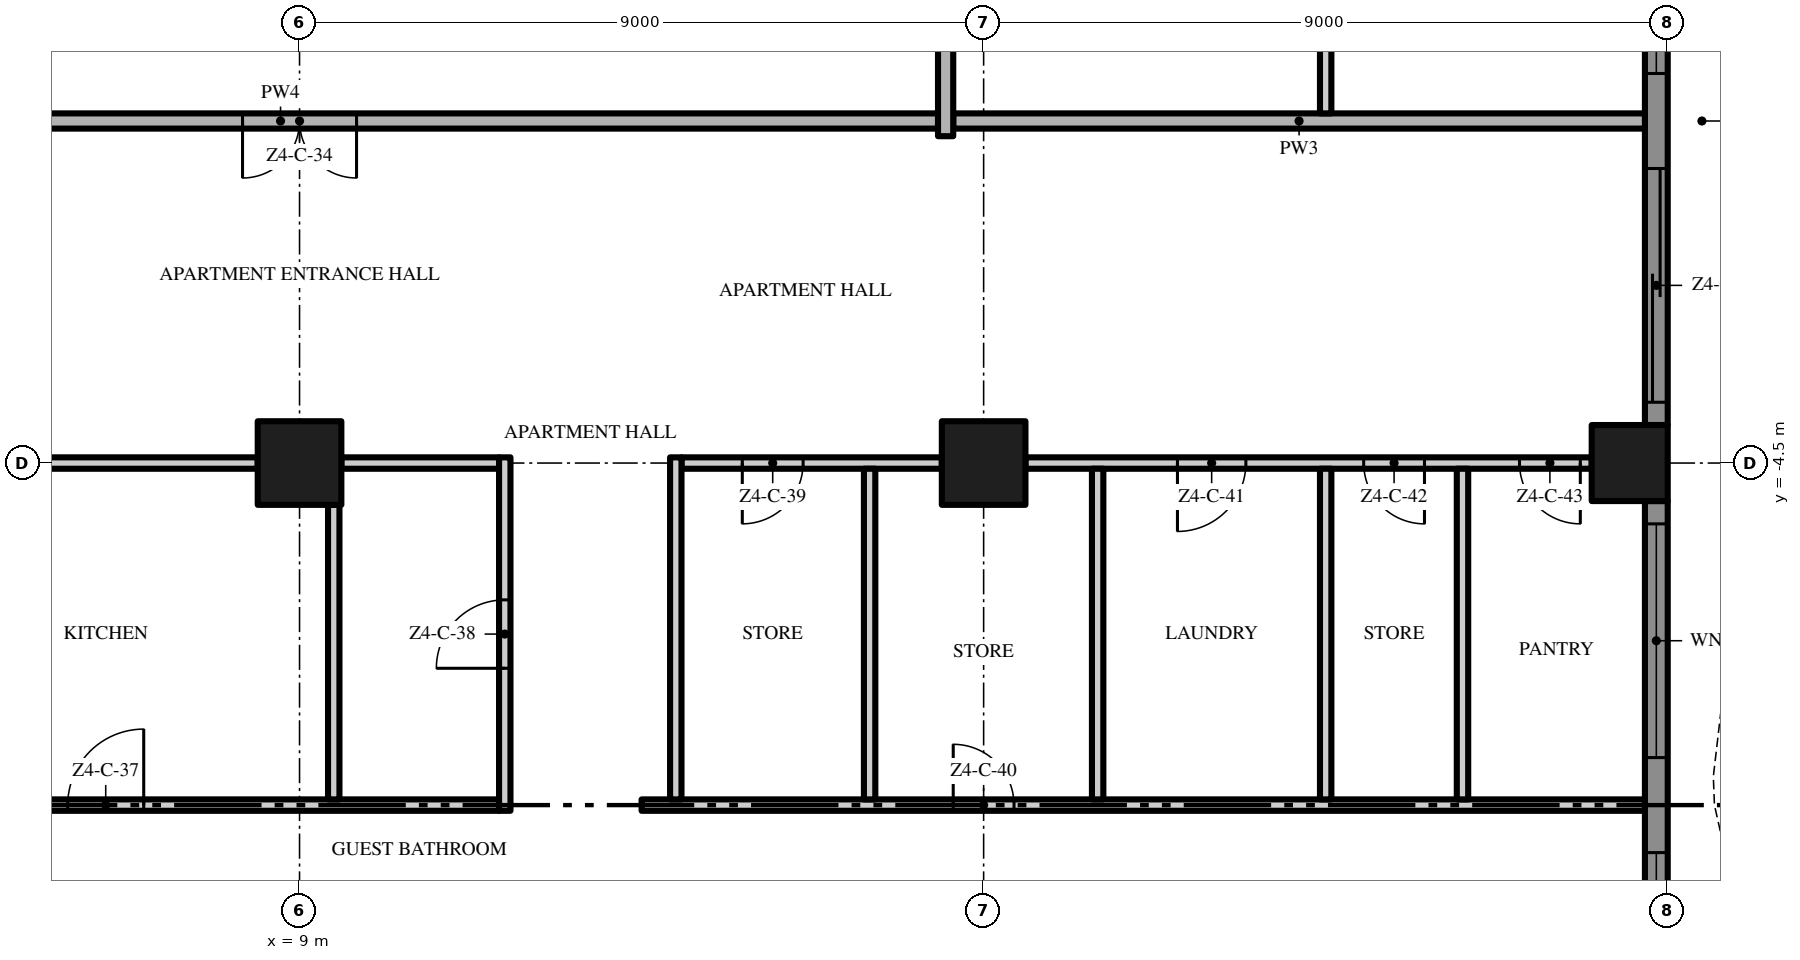
"""IFC4 building model, lengths in metres.
Left out: names, types, materials, properties, quantities, classifications, styles, units other than length and angle.
Written with IfcOpenShell. Run it as: python <this file> out.ifc"""

import sys

from ifc_helpers import new_model, si_unit, direction, frame, frame_2d, origin, origin_2d, place, context, subcontext, project, spatial, polyline, rectangle, outline, extrude, element, fill, save


model = new_model("IFC4")
c1 = context("Model", 3, precision=1e-05, world=origin(), true_north=direction((0.0, 1.0)))
c2 = subcontext(c1, "Body", "Model", "MODEL_VIEW")
j1 = project(units=[si_unit("LENGTHUNIT", "METRE"), si_unit("PLANEANGLEUNIT", "RADIAN")], contexts=[c1])
p1 = place(None, origin())
s1 = spatial("IfcSite", under=j1, at=p1, CompositionType="ELEMENT")
p2 = place(p1, origin())
s2 = spatial("IfcBuilding", under=s1, at=p2, CompositionType="ELEMENT")
p3 = place(p2, frame((0.0, 0.0, 214.8)))
s3 = spatial("IfcBuildingStorey", under=s2, at=p3, CompositionType="ELEMENT", Elevation=214.8)
p4 = place(p3, frame((18.0, -4.5, 0.0), z_axis=(0.0, 0.0, 1.0), x_axis=(1.0, 0.0, 0.0)))
e1 = element("IfcColumn", 1, at=p4, inside=s3, PredefinedType="COLUMN", context=c2, shape_type="SweptSolid", body=[
    extrude(rectangle(XDim=1.1, YDim=1.1, at=origin_2d()), origin(), (0.0, 0.0, 1.0), 3.5),
])
p5 = place(p3, frame((26.5, -4.5, 0.0), z_axis=(0.0, 0.0, 1.0), x_axis=(1.0, 0.0, 0.0)))
e2 = element("IfcColumn", 2, at=p5, inside=s3, PredefinedType="COLUMN", context=c2, shape_type="SweptSolid", body=[
    extrude(rectangle(XDim=1.0, YDim=1.0, at=origin_2d()), origin(), (0.0, 0.0, 1.0), 3.5),
])
p6 = place(p3, frame((9.0, -4.5, 0.0), z_axis=(0.0, 0.0, 1.0), x_axis=(1.0, 0.0, 0.0)))
e3 = element("IfcColumn", 3, at=p6, inside=s3, PredefinedType="COLUMN", context=c2, shape_type="SweptSolid", body=[
    extrude(rectangle(XDim=1.1, YDim=1.1, at=origin_2d()), origin(), (0.0, 0.0, 1.0), 3.5),
])
p7 = place(p3, frame((26.85, -5.0, 0.0), z_axis=(0.0, 0.0, 1.0), x_axis=(0.0, -1.0, 0.0)))
e4 = element("IfcWall", 4, at=p7, inside=s3, PredefinedType="SOLIDWALL", context=c2, shape_type="SweptSolid", body=[
    extrude(rectangle(XDim=8.0, YDim=0.3, at=frame_2d((4.0, 0.0))), origin(), (0.0, 0.0, 1.0), 3.5),
])
p8 = place(p7, frame((4.625, 0.0, 0.45)))
e5 = element("IfcOpeningElement", 5, at=p8, cuts=e4, PredefinedType="OPENING", context=c2, shape_type="SweptSolid", body=[
    extrude(rectangle(XDim=3.075, YDim=2.65, at=frame_2d((1.538, 1.325))), frame((0.0, 0.16, 0.0), z_axis=(0.0, -1.0, 0.0), x_axis=(1.0, 0.0, 0.0)), (0.0, 0.0, 1.0), 0.32),
])
p9 = place(p7, frame((0.3, 0.0, 0.45)))
e6 = element("IfcOpeningElement", 6, at=p9, cuts=e4, PredefinedType="OPENING", context=c2, shape_type="SweptSolid", body=[
    extrude(rectangle(XDim=3.075, YDim=2.65, at=frame_2d((1.538, 1.325))), frame((0.0, 0.16, 0.0), z_axis=(0.0, -1.0, 0.0), x_axis=(1.0, 0.0, 0.0)), (0.0, 0.0, 1.0), 0.32),
])
p10 = place(p3, frame((26.85, 4.0, 0.0), z_axis=(0.0, 0.0, 1.0), x_axis=(0.0, -1.0, 0.0)))
e7 = element("IfcWall", 7, at=p10, inside=s3, PredefinedType="SOLIDWALL", context=c2, shape_type="SweptSolid", body=[
    extrude(rectangle(XDim=8.0, YDim=0.3, at=frame_2d((4.0, 0.0))), origin(), (0.0, 0.0, 1.0), 3.5),
])
p11 = place(p10, frame((4.625, 0.0, 0.0)))
e8 = element("IfcOpeningElement", 8, at=p11, cuts=e7, PredefinedType="OPENING", context=c2, shape_type="SweptSolid", body=[
    extrude(rectangle(XDim=3.075, YDim=2.4, at=frame_2d((1.538, 1.2))), frame((0.0, 0.16, 0.0), z_axis=(0.0, -1.0, 0.0), x_axis=(1.0, 0.0, 0.0)), (0.0, 0.0, 1.0), 0.32),
])
p12 = place(p10, frame((0.3, 0.0, 0.45)))
e9 = element("IfcOpeningElement", 9, at=p12, cuts=e7, PredefinedType="OPENING", context=c2, shape_type="SweptSolid", body=[
    extrude(rectangle(XDim=3.075, YDim=2.65, at=frame_2d((1.538, 1.325))), frame((0.0, 0.16, 0.0), z_axis=(0.0, -1.0, 0.0), x_axis=(1.0, 0.0, 0.0)), (0.0, 0.0, 1.0), 0.32),
])
p13 = place(p3, origin())
e10 = element("IfcWall", 10, at=p13, inside=s3, PredefinedType="USERDEFINED", context=c2, shape_type="SweptSolid", body=[
    extrude(outline(polyline([(29.649, -18.0), (29.985, -16.5), (30.0, -16.125), (29.869, -15.0), (29.345, -13.5), (28.612, -12.0), (27.951, -10.5), (27.615, -9.0), (27.6, -8.625), (27.731, -7.5), (28.255, -6.0), (28.988, -4.5), (29.649, -3.0), (29.985, -1.5), (30.0, -1.125), (29.869, 0.0), (29.345, 1.5), (28.612, 3.0), (27.951, 4.5), (27.615, 6.0), (27.6, 6.375), (27.731, 7.5), (28.255, 9.0), (28.988, 10.5), (29.649, 12.0), (29.985, 13.5), (30.0, 13.875), (29.869, 15.0), (29.345, 16.5), (28.612, 18.0), (28.388, 17.89), (29.114, 16.404), (29.624, 14.944), (29.749, 13.865), (29.736, 13.533), (29.41, 12.079), (28.761, 10.605), (28.024, 9.096), (27.486, 7.556), (27.349, 6.385), (27.366, 5.967), (27.713, 4.421), (28.385, 2.895), (29.114, 1.404), (29.624, -0.056), (29.749, -1.135), (29.736, -1.467), (29.41, -2.921), (28.761, -4.395), (28.024, -5.904), (27.486, -7.444), (27.349, -8.615), (27.366, -9.033), (27.713, -10.579), (28.385, -12.105), (29.114, -13.596), (29.624, -15.056), (29.749, -16.135), (29.736, -16.467), (29.405, -17.945), (29.649, -18.0)])), origin(), (0.0, 0.0, 1.0), 0.9),
])
p14 = place(p3, frame((0.1, -9.0, 0.0), z_axis=(0.0, 0.0, 1.0), x_axis=(1.0, 0.0, 0.0)))
e11 = element("IfcWall", 11, at=p14, inside=s3, PredefinedType="PARTITIONING", context=c2, shape_type="SweptSolid", body=[
    extrude(rectangle(XDim=11.525, YDim=0.15, at=frame_2d((5.763, 0.0))), origin(), (0.0, 0.0, 1.0), 3.5),
])
p15 = place(p14, frame((5.85, 0.0, 0.0)))
e12 = element("IfcOpeningElement", 12, at=p15, cuts=e11, PredefinedType="OPENING", context=c2, shape_type="SweptSolid", body=[
    extrude(rectangle(XDim=1.0, YDim=2.4, at=frame_2d((0.5, 1.2))), frame((0.0, 0.085, 0.0), z_axis=(0.0, -1.0, 0.0), x_axis=(1.0, 0.0, 0.0)), (0.0, 0.0, 1.0), 0.17),
])
p16 = place(p3, frame((13.5, -9.0, 0.0), z_axis=(0.0, 0.0, 1.0), x_axis=(1.0, 0.0, 0.0)))
e13 = element("IfcWall", 13, at=p16, inside=s3, PredefinedType="PARTITIONING", context=c2, shape_type="SweptSolid", body=[
    extrude(rectangle(XDim=13.2, YDim=0.15, at=frame_2d((6.6, 0.0))), origin(), (0.0, 0.0, 1.0), 3.5),
])
p17 = place(p16, frame((4.1, 0.0, 0.0)))
e14 = element("IfcOpeningElement", 14, at=p17, cuts=e13, PredefinedType="OPENING", context=c2, shape_type="SweptSolid", body=[
    extrude(rectangle(XDim=0.8, YDim=2.0, at=frame_2d((0.4, 1.0))), frame((0.0, 0.085, 0.0), z_axis=(0.0, -1.0, 0.0), x_axis=(1.0, 0.0, 0.0)), (0.0, 0.0, 1.0), 0.17),
])
p18 = place(p3, frame((8.45, -4.5, 0.0), z_axis=(0.0, 0.0, 1.0), x_axis=(-1.0, 0.0, 0.0)))
e15 = element("IfcWall", 15, at=p18, inside=s3, PredefinedType="PARTITIONING", context=c2, shape_type="SweptSolid", body=[
    extrude(rectangle(XDim=7.9, YDim=0.15, at=frame_2d((3.95, 0.0))), origin(), (0.0, 0.0, 1.0), 3.5),
])
p19 = place(p18, frame((6.95, 0.0, 0.0)))
e16 = element("IfcOpeningElement", 16, at=p19, cuts=e15, PredefinedType="OPENING", context=c2, shape_type="SweptSolid", body=[
    extrude(rectangle(XDim=0.8, YDim=2.0, at=frame_2d((0.4, 1.0))), frame((0.0, 0.085, 0.0), z_axis=(0.0, -1.0, 0.0), x_axis=(1.0, 0.0, 0.0)), (0.0, 0.0, 1.0), 0.17),
])
p20 = place(p18, frame((5.45, 0.0, 0.0)))
e17 = element("IfcOpeningElement", 17, at=p20, cuts=e15, PredefinedType="OPENING", context=c2, shape_type="SweptSolid", body=[
    extrude(rectangle(XDim=0.8, YDim=2.0, at=frame_2d((0.4, 1.0))), frame((0.0, 0.085, 0.0), z_axis=(0.0, -1.0, 0.0), x_axis=(1.0, 0.0, 0.0)), (0.0, 0.0, 1.0), 0.17),
])
p21 = place(p3, frame((9.55, -4.5, 0.0), z_axis=(0.0, 0.0, 1.0), x_axis=(1.0, 0.0, 0.0)))
e18 = element("IfcWall", 18, at=p21, inside=s3, PredefinedType="PARTITIONING", context=c2, shape_type="SweptSolid", body=[
    extrude(rectangle(XDim=2.075, YDim=0.15, at=frame_2d((1.038, 0.0))), origin(), (0.0, 0.0, 1.0), 3.5),
])
p22 = place(p3, frame((17.45, -4.5, 0.0), z_axis=(0.0, 0.0, 1.0), x_axis=(-1.0, 0.0, 0.0)))
e19 = element("IfcWall", 19, at=p22, inside=s3, PredefinedType="PARTITIONING", context=c2, shape_type="SweptSolid", body=[
    extrude(rectangle(XDim=3.425, YDim=0.15, at=frame_2d((1.712, 0.0))), origin(), (0.0, 0.0, 1.0), 3.5),
])
p23 = place(p22, frame((1.825, 0.0, 0.0)))
e20 = element("IfcOpeningElement", 20, at=p23, cuts=e19, PredefinedType="OPENING", context=c2, shape_type="SweptSolid", body=[
    extrude(rectangle(XDim=0.8, YDim=2.0, at=frame_2d((0.4, 1.0))), frame((0.0, 0.085, 0.0), z_axis=(0.0, -1.0, 0.0), x_axis=(1.0, 0.0, 0.0)), (0.0, 0.0, 1.0), 0.17),
])
p24 = place(p3, frame((26.0, -4.5, 0.0), z_axis=(0.0, 0.0, 1.0), x_axis=(-1.0, 0.0, 0.0)))
e21 = element("IfcWall", 21, at=p24, inside=s3, PredefinedType="PARTITIONING", context=c2, shape_type="SweptSolid", body=[
    extrude(rectangle(XDim=7.45, YDim=0.15, at=frame_2d((3.725, 0.0))), origin(), (0.0, 0.0, 1.0), 3.5),
])
p25 = place(p24, frame((4.55, 0.0, 0.0)))
e22 = element("IfcOpeningElement", 22, at=p25, cuts=e21, PredefinedType="OPENING", context=c2, shape_type="SweptSolid", body=[
    extrude(rectangle(XDim=0.9, YDim=2.1, at=frame_2d((0.45, 1.05))), frame((0.0, 0.085, 0.0), z_axis=(0.0, -1.0, 0.0), x_axis=(1.0, 0.0, 0.0)), (0.0, 0.0, 1.0), 0.17),
])
p26 = place(p24, frame((2.2, 0.0, 0.0)))
e23 = element("IfcOpeningElement", 23, at=p26, cuts=e21, PredefinedType="OPENING", context=c2, shape_type="SweptSolid", body=[
    extrude(rectangle(XDim=0.8, YDim=2.0, at=frame_2d((0.4, 1.0))), frame((0.0, 0.085, 0.0), z_axis=(0.0, -1.0, 0.0), x_axis=(1.0, 0.0, 0.0)), (0.0, 0.0, 1.0), 0.17),
])
p27 = place(p24, frame((0.15, 0.0, 0.0)))
e24 = element("IfcOpeningElement", 24, at=p27, cuts=e21, PredefinedType="OPENING", context=c2, shape_type="SweptSolid", body=[
    extrude(rectangle(XDim=0.8, YDim=2.0, at=frame_2d((0.4, 1.0))), frame((0.0, 0.085, 0.0), z_axis=(0.0, -1.0, 0.0), x_axis=(1.0, 0.0, 0.0)), (0.0, 0.0, 1.0), 0.17),
])
p28 = place(p3, frame((17.4, 0.0, 0.0), z_axis=(0.0, 0.0, 1.0), x_axis=(-1.0, 0.0, 0.0)))
e25 = element("IfcWall", 25, at=p28, inside=s3, PredefinedType="PARTITIONING", context=c2, shape_type="SweptSolid", body=[
    extrude(rectangle(XDim=17.3, YDim=0.2, at=frame_2d((8.65, 0.0))), origin(), (0.0, 0.0, 1.0), 3.5),
])
p29 = place(p28, frame((7.65, 0.0, 0.0)))
e26 = element("IfcOpeningElement", 26, at=p29, cuts=e25, PredefinedType="OPENING", context=c2, shape_type="SweptSolid", body=[
    extrude(rectangle(XDim=1.5, YDim=2.4, at=frame_2d((0.75, 1.2))), frame((0.0, 0.11, 0.0), z_axis=(0.0, -1.0, 0.0), x_axis=(1.0, 0.0, 0.0)), (0.0, 0.0, 1.0), 0.22),
])
p30 = place(p3, frame((17.6, 0.0, 0.0), z_axis=(0.0, 0.0, 1.0), x_axis=(1.0, 0.0, 0.0)))
e27 = element("IfcWall", 27, at=p30, inside=s3, PredefinedType="PARTITIONING", context=c2, shape_type="SweptSolid", body=[
    extrude(rectangle(XDim=9.1, YDim=0.2, at=frame_2d((4.55, 0.0))), origin(), (0.0, 0.0, 1.0), 3.5),
])
p31 = place(p3, frame((9.45, -8.925, 0.0), z_axis=(0.0, 0.0, 1.0), x_axis=(0.0, 1.0, 0.0)))
e28 = element("IfcWall", 28, at=p31, inside=s3, PredefinedType="PARTITIONING", context=c2, shape_type="SweptSolid", body=[
    extrude(rectangle(XDim=3.875, YDim=0.15, at=frame_2d((1.938, 0.0))), origin(), (0.0, 0.0, 1.0), 3.5),
])
p32 = place(p3, frame((11.7, -9.075, 0.0), z_axis=(0.0, 0.0, 1.0), x_axis=(0.0, 1.0, 0.0)))
e29 = element("IfcWall", 29, at=p32, inside=s3, PredefinedType="PARTITIONING", context=c2, shape_type="SweptSolid", body=[
    extrude(rectangle(XDim=4.65, YDim=0.15, at=frame_2d((2.325, 0.0))), origin(), (0.0, 0.0, 1.0), 3.5),
])
p33 = place(p32, frame((1.875, 0.0, 0.0)))
e30 = element("IfcOpeningElement", 30, at=p33, cuts=e29, PredefinedType="OPENING", context=c2, shape_type="SweptSolid", body=[
    extrude(rectangle(XDim=0.9, YDim=2.1, at=frame_2d((0.45, 1.05))), frame((0.0, 0.085, 0.0), z_axis=(0.0, -1.0, 0.0), x_axis=(1.0, 0.0, 0.0)), (0.0, 0.0, 1.0), 0.17),
])
p34 = place(p3, frame((13.95, -8.925, 0.0), z_axis=(0.0, 0.0, 1.0), x_axis=(0.0, 1.0, 0.0)))
e31 = element("IfcWall", 31, at=p34, inside=s3, PredefinedType="PARTITIONING", context=c2, shape_type="SweptSolid", body=[
    extrude(rectangle(XDim=4.5, YDim=0.15, at=frame_2d((2.25, 0.0))), origin(), (0.0, 0.0, 1.0), 3.5),
])
p35 = place(p3, frame((16.5, -8.925, 0.0), z_axis=(0.0, 0.0, 1.0), x_axis=(0.0, 1.0, 0.0)))
e32 = element("IfcWall", 32, at=p35, inside=s3, PredefinedType="PARTITIONING", context=c2, shape_type="SweptSolid", body=[
    extrude(rectangle(XDim=4.35, YDim=0.15, at=frame_2d((2.175, 0.0))), origin(), (0.0, 0.0, 1.0), 3.5),
])
p36 = place(p3, frame((17.5, -0.2, 0.0), z_axis=(0.0, 0.0, 1.0), x_axis=(0.0, 1.0, 0.0)))
e33 = element("IfcWall", 33, at=p36, inside=s3, PredefinedType="PARTITIONING", context=c2, shape_type="SweptSolid", body=[
    extrude(rectangle(XDim=4.15, YDim=0.2, at=frame_2d((2.075, 0.0))), origin(), (0.0, 0.0, 1.0), 3.5),
])
for number, where, z_axis, x_axis in (
    (34, (19.5, -8.925, 0.0), (0.0, 0.0, 1.0), (0.0, 1.0, 0.0)),
    (35, (22.5, -8.925, 0.0), (0.0, 0.0, 1.0), (0.0, 1.0, 0.0)),
):
    element("IfcWall", number, at=place(p3, frame(where, z_axis=z_axis, x_axis=x_axis)), inside=s3, PredefinedType="PARTITIONING", context=c2, shape_type="SweptSolid", body=[
        extrude(rectangle(XDim=4.35, YDim=0.15, at=frame_2d((2.175, 0.0))), origin(), (0.0, 0.0, 1.0), 3.5),
    ])
p37 = place(p3, frame((22.5, 17.5, 0.0), z_axis=(0.0, 0.0, 1.0), x_axis=(0.0, -1.0, 0.0)))
e36 = element("IfcWall", 36, at=p37, inside=s3, PredefinedType="PARTITIONING", context=c2, shape_type="SweptSolid", body=[
    extrude(rectangle(XDim=17.4, YDim=0.15, at=frame_2d((8.7, 0.0))), origin(), (0.0, 0.0, 1.0), 3.5),
])
p38 = place(p37, frame((14.75, 0.0, 0.0)))
e37 = element("IfcOpeningElement", 37, at=p38, cuts=e36, PredefinedType="OPENING", context=c2, shape_type="SweptSolid", body=[
    extrude(rectangle(XDim=1.0, YDim=2.4, at=frame_2d((0.5, 1.2))), frame((0.0, 0.085, 0.0), z_axis=(0.0, -1.0, 0.0), x_axis=(1.0, 0.0, 0.0)), (0.0, 0.0, 1.0), 0.17),
])
p39 = place(p37, frame((11.4, 0.0, 0.0)))
e38 = element("IfcOpeningElement", 38, at=p39, cuts=e36, PredefinedType="OPENING", context=c2, shape_type="SweptSolid", body=[
    extrude(rectangle(XDim=1.0, YDim=2.4, at=frame_2d((0.5, 1.2))), frame((0.0, 0.085, 0.0), z_axis=(0.0, -1.0, 0.0), x_axis=(1.0, 0.0, 0.0)), (0.0, 0.0, 1.0), 0.17),
])
p40 = place(p37, frame((4.25, 0.0, 0.0)))
e39 = element("IfcOpeningElement", 39, at=p40, cuts=e36, PredefinedType="OPENING", context=c2, shape_type="SweptSolid", body=[
    extrude(rectangle(XDim=1.0, YDim=2.4, at=frame_2d((0.5, 1.2))), frame((0.0, 0.085, 0.0), z_axis=(0.0, -1.0, 0.0), x_axis=(1.0, 0.0, 0.0)), (0.0, 0.0, 1.0), 0.17),
])
p41 = place(p3, frame((24.3, -8.925, 0.0), z_axis=(0.0, 0.0, 1.0), x_axis=(0.0, 1.0, 0.0)))
e40 = element("IfcWall", 40, at=p41, inside=s3, PredefinedType="PARTITIONING", context=c2, shape_type="SweptSolid", body=[
    extrude(rectangle(XDim=4.35, YDim=0.15, at=frame_2d((2.175, 0.0))), origin(), (0.0, 0.0, 1.0), 3.5),
])
p42 = place(p8, origin())
e41 = element("IfcWindow", 41, at=p42, inside=s3, PartitioningType="SINGLE_PANEL", PredefinedType="WINDOW", context=c2, shape_type="SweptSolid", body=[
    extrude(rectangle(XDim=3.075, YDim=2.65, at=frame_2d((1.538, 1.325))), frame((0.0, 0.03, 0.0), z_axis=(0.0, -1.0, 0.0), x_axis=(1.0, 0.0, 0.0)), (0.0, 0.0, 1.0), 0.06),
])
fill(e5, e41)
p43 = place(p9, origin())
e42 = element("IfcWindow", 42, at=p43, inside=s3, PartitioningType="SINGLE_PANEL", PredefinedType="WINDOW", context=c2, shape_type="SweptSolid", body=[
    extrude(rectangle(XDim=3.075, YDim=2.65, at=frame_2d((1.538, 1.325))), frame((0.0, 0.03, 0.0), z_axis=(0.0, -1.0, 0.0), x_axis=(1.0, 0.0, 0.0)), (0.0, 0.0, 1.0), 0.06),
])
fill(e6, e42)
p44 = place(p11, origin())
e43 = element("IfcDoor", 43, at=p44, inside=s3, OperationType="SINGLE_SWING_LEFT", PredefinedType="DOOR", context=c2, shape_type="SweptSolid", body=[
    extrude(rectangle(XDim=3.075, YDim=2.4, at=frame_2d((1.538, 1.2))), frame((0.0, 0.025, 0.0), z_axis=(0.0, -1.0, 0.0), x_axis=(1.0, 0.0, 0.0)), (0.0, 0.0, 1.0), 0.05),
])
fill(e8, e43)
p45 = place(p12, origin())
e44 = element("IfcWindow", 44, at=p45, inside=s3, PartitioningType="SINGLE_PANEL", PredefinedType="WINDOW", context=c2, shape_type="SweptSolid", body=[
    extrude(rectangle(XDim=3.075, YDim=2.65, at=frame_2d((1.538, 1.325))), frame((0.0, 0.03, 0.0), z_axis=(0.0, -1.0, 0.0), x_axis=(1.0, 0.0, 0.0)), (0.0, 0.0, 1.0), 0.06),
])
fill(e9, e44)
p46 = place(p29, origin())
e45 = element("IfcDoor", 45, at=p46, inside=s3, OperationType="DOUBLE_DOOR_SINGLE_SWING", PredefinedType="DOOR", context=c2, shape_type="SweptSolid", body=[
    extrude(rectangle(XDim=1.5, YDim=2.4, at=frame_2d((0.75, 1.2))), frame((0.0, 0.025, 0.0), z_axis=(0.0, -1.0, 0.0), x_axis=(1.0, 0.0, 0.0)), (0.0, 0.0, 1.0), 0.05),
])
fill(e26, e45)
p47 = place(p15, origin())
e46 = element("IfcDoor", 46, at=p47, inside=s3, OperationType="SINGLE_SWING_RIGHT", PredefinedType="DOOR", context=c2, shape_type="SweptSolid", body=[
    extrude(rectangle(XDim=1.0, YDim=2.4, at=frame_2d((0.5, 1.2))), frame((0.0, 0.025, 0.0), z_axis=(0.0, -1.0, 0.0), x_axis=(1.0, 0.0, 0.0)), (0.0, 0.0, 1.0), 0.05),
])
fill(e12, e46)
p48 = place(p33, origin())
e47 = element("IfcDoor", 47, at=p48, inside=s3, OperationType="SINGLE_SWING_LEFT", PredefinedType="DOOR", context=c2, shape_type="SweptSolid", body=[
    extrude(rectangle(XDim=0.9, YDim=2.1, at=frame_2d((0.45, 1.05))), frame((0.0, 0.025, 0.0), z_axis=(0.0, -1.0, 0.0), x_axis=(1.0, 0.0, 0.0)), (0.0, 0.0, 1.0), 0.05),
])
fill(e30, e47)
p49 = place(p23, origin())
e48 = element("IfcDoor", 48, at=p49, inside=s3, OperationType="SINGLE_SWING_RIGHT", PredefinedType="DOOR", context=c2, shape_type="SweptSolid", body=[
    extrude(rectangle(XDim=0.8, YDim=2.0, at=frame_2d((0.4, 1.0))), frame((0.0, 0.025, 0.0), z_axis=(0.0, -1.0, 0.0), x_axis=(1.0, 0.0, 0.0)), (0.0, 0.0, 1.0), 0.05),
])
fill(e20, e48)
p50 = place(p17, origin())
e49 = element("IfcDoor", 49, at=p50, inside=s3, OperationType="SINGLE_SWING_LEFT", PredefinedType="DOOR", context=c2, shape_type="SweptSolid", body=[
    extrude(rectangle(XDim=0.8, YDim=2.0, at=frame_2d((0.4, 1.0))), frame((0.0, 0.025, 0.0), z_axis=(0.0, -1.0, 0.0), x_axis=(1.0, 0.0, 0.0)), (0.0, 0.0, 1.0), 0.05),
])
fill(e14, e49)
p51 = place(p25, origin())
e50 = element("IfcDoor", 50, at=p51, inside=s3, OperationType="SINGLE_SWING_RIGHT", PredefinedType="DOOR", context=c2, shape_type="SweptSolid", body=[
    extrude(rectangle(XDim=0.9, YDim=2.1, at=frame_2d((0.45, 1.05))), frame((0.0, 0.025, 0.0), z_axis=(0.0, -1.0, 0.0), x_axis=(1.0, 0.0, 0.0)), (0.0, 0.0, 1.0), 0.05),
])
fill(e22, e50)
p52 = place(p26, origin())
e51 = element("IfcDoor", 51, at=p52, inside=s3, OperationType="SINGLE_SWING_LEFT", PredefinedType="DOOR", context=c2, shape_type="SweptSolid", body=[
    extrude(rectangle(XDim=0.8, YDim=2.0, at=frame_2d((0.4, 1.0))), frame((0.0, 0.025, 0.0), z_axis=(0.0, -1.0, 0.0), x_axis=(1.0, 0.0, 0.0)), (0.0, 0.0, 1.0), 0.05),
])
fill(e23, e51)
p53 = place(p27, origin())
e52 = element("IfcDoor", 52, at=p53, inside=s3, OperationType="SINGLE_SWING_LEFT", PredefinedType="DOOR", context=c2, shape_type="SweptSolid", body=[
    extrude(rectangle(XDim=0.8, YDim=2.0, at=frame_2d((0.4, 1.0))), frame((0.0, 0.025, 0.0), z_axis=(0.0, -1.0, 0.0), x_axis=(1.0, 0.0, 0.0)), (0.0, 0.0, 1.0), 0.05),
])
fill(e24, e52)
save(model, sys.argv[1])
